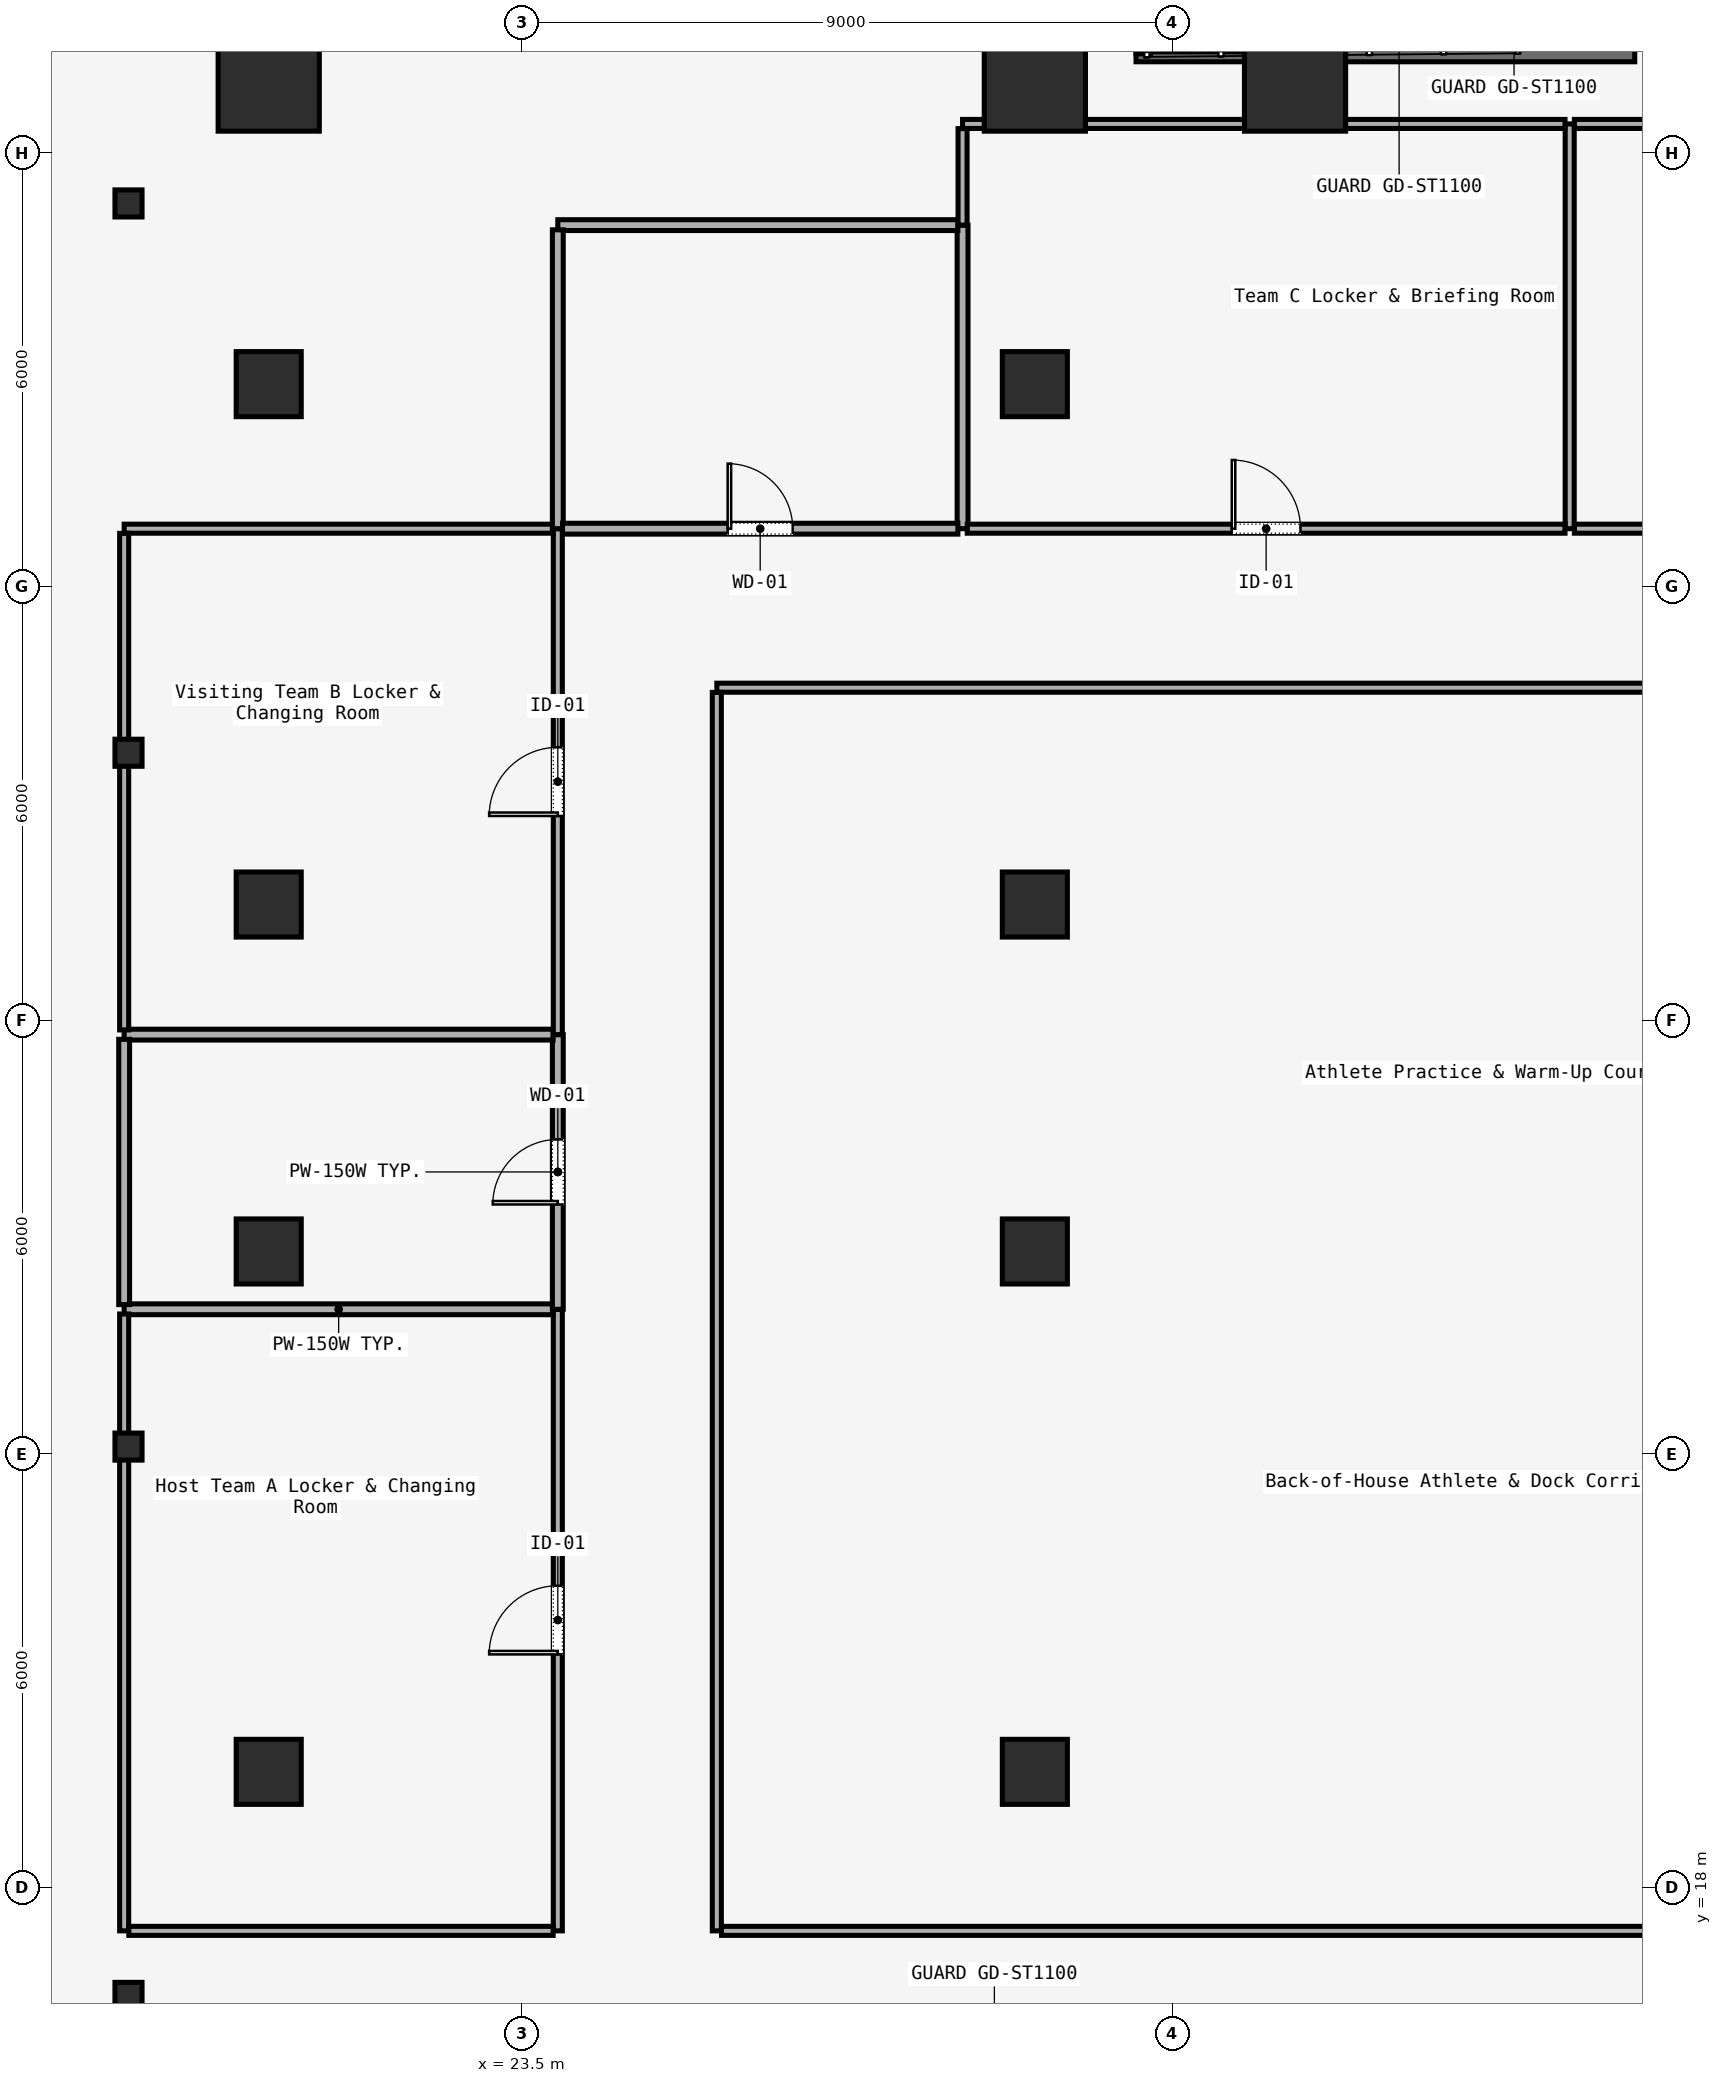
"""IFC4 building model, lengths in metres.
Left out: names, types, materials, properties, quantities, classifications, styles, units other than length and angle.
Written with IfcOpenShell. Run it as: python <this file> out.ifc"""

import sys

from ifc_helpers import new_model, si_unit, direction, frame, frame_2d, origin, origin_2d, place, context, subcontext, project, spatial, rectangle, i_section, extrude, element, fill, save


model = new_model("IFC4")
c1 = context("Model", 3, precision=1e-05, world=origin(), true_north=direction((0.0, 1.0)))
c2 = subcontext(c1, "Body", "Model", "MODEL_VIEW")
j1 = project(units=[si_unit("LENGTHUNIT", "METRE"), si_unit("PLANEANGLEUNIT", "RADIAN")], contexts=[c1])
p1 = place(None, origin())
s1 = spatial("IfcSite", under=j1, at=p1, CompositionType="ELEMENT")
p2 = place(p1, origin())
s2 = spatial("IfcBuilding", under=s1, at=p2, CompositionType="ELEMENT")
p3 = place(p2, frame((0.0, 0.0, -4.5)))
s3 = spatial("IfcBuildingStorey", under=s2, at=p3, CompositionType="ELEMENT", Elevation=-4.5)
for number, where, z_axis, x_axis in (
    (1, (20.0, 43.0, 0.0), (0.0, 0.0, 1.0), (1.0, 0.0, 0.0)),
    (2, (30.6, 43.0, 0.0), (0.0, 0.0, 1.0), (1.0, 0.0, 0.0)),
    (3, (34.2, 43.0, 0.0), (0.0, 0.0, 1.0), (1.0, 0.0, 0.0)),
):
    element("IfcColumn", number, at=place(p3, frame(where, z_axis=z_axis, x_axis=x_axis)), inside=s3, PredefinedType="COLUMN", context=c2, shape_type="SweptSolid", body=[
        extrude(rectangle(XDim=1.4, YDim=1.4, at=origin_2d()), origin(), (0.0, 0.0, 1.0), 4.1),
    ])
for number, where, z_axis, x_axis in (
    (4, (20.0, 19.6, 0.0), (0.0, 0.0, 1.0), (1.0, 0.0, 0.0)),
    (5, (20.0, 26.8, 0.0), (0.0, 0.0, 1.0), (1.0, 0.0, 0.0)),
    (6, (20.0, 31.6, 0.0), (0.0, 0.0, 1.0), (1.0, 0.0, 0.0)),
    (7, (20.0, 38.8, 0.0), (0.0, 0.0, 1.0), (1.0, 0.0, 0.0)),
    (8, (30.6, 19.6, 0.0), (0.0, 0.0, 1.0), (1.0, 0.0, 0.0)),
    (9, (30.6, 26.8, 0.0), (0.0, 0.0, 1.0), (1.0, 0.0, 0.0)),
    (10, (30.6, 31.6, 0.0), (0.0, 0.0, 1.0), (1.0, 0.0, 0.0)),
    (11, (30.6, 38.8, 0.0), (0.0, 0.0, 1.0), (1.0, 0.0, 0.0)),
):
    element("IfcColumn", number, at=place(p3, frame(where, z_axis=z_axis, x_axis=x_axis)), inside=s3, PredefinedType="COLUMN", context=c2, shape_type="SweptSolid", body=[
        extrude(rectangle(XDim=0.9, YDim=0.9, at=origin_2d()), origin(), (0.0, 0.0, 1.0), 4.1),
    ])
for number, where, z_axis, x_axis in (
    (12, (18.06, 16.5, 0.0), (0.0, 0.0, 1.0), (1.0, 0.0, 0.0)),
    (13, (18.06, 24.1, 0.0), (0.0, 0.0, 1.0), (1.0, 0.0, 0.0)),
    (14, (18.06, 33.7, 0.0), (0.0, 0.0, 1.0), (1.0, 0.0, 0.0)),
    (15, (18.06, 41.3, 0.0), (0.0, 0.0, 1.0), (1.0, 0.0, 0.0)),
):
    element("IfcColumn", number, at=place(p3, frame(where, z_axis=z_axis, x_axis=x_axis)), inside=s3, PredefinedType="COLUMN", context=c2, shape_type="SweptSolid", body=[
        extrude(i_section(OverallWidth=0.375, OverallDepth=0.375, WebThickness=0.017, FlangeThickness=0.027, FilletRadius=0.015, at=origin_2d()), origin(), (0.0, 0.0, 1.0), 4.1),
    ])
p4 = place(p3, frame((38.9, 43.36, 0.0), z_axis=(0.0, 0.0, 1.0), x_axis=(-1.0, 0.0, 0.0)))
e16 = element("IfcWall", 16, at=p4, inside=s3, PredefinedType="SOLIDWALL", context=c2, shape_type="SweptSolid", body=[
    extrude(rectangle(XDim=6.9, YDim=0.2, at=frame_2d((3.45, 0.0))), origin(), (0.0, 0.0, 1.0), 4.5),
])
p5 = place(p3, frame((32.1, 46.93, 0.0), z_axis=(0.0, 0.0, 1.0), x_axis=(0.0, -1.0, 0.0)))
e17 = element("IfcWall", 17, at=p5, inside=s3, PredefinedType="SOLIDWALL", context=c2, shape_type="SweptSolid", body=[
    extrude(rectangle(XDim=3.56, YDim=0.2, at=frame_2d((1.78, 0.0))), origin(), (0.0, 0.0, 1.0), 4.5),
])
p6 = place(p3, frame((57.735, 34.6, 0.0), z_axis=(0.0, 0.0, 1.0), x_axis=(-1.0, 0.0, 0.0)))
e18 = element("IfcWall", 18, at=p6, inside=s3, PredefinedType="PARTITIONING", context=c2, shape_type="SweptSolid", body=[
    extrude(rectangle(XDim=31.535, YDim=0.125, at=frame_2d((15.768, 0.0))), origin(), (0.0, 0.0, 1.0), 3.143),
])
p7 = place(p6, frame((15.292, 0.0, 0.0)))
e19 = element("IfcOpeningElement", 19, at=p7, cuts=e18, PredefinedType="OPENING", context=c2, shape_type="SweptSolid", body=[
    extrude(rectangle(XDim=0.95, YDim=2.2, at=frame_2d((0.475, 1.1))), frame((0.0, 0.062, 0.0), z_axis=(0.0, -1.0, 0.0), x_axis=(1.0, 0.0, 0.0)), (0.0, 0.0, 1.0), 0.125),
])
p8 = place(p3, frame((26.2, 34.535, 0.0), z_axis=(0.0, 0.0, 1.0), x_axis=(0.0, -1.0, 0.0)))
e20 = element("IfcWall", 20, at=p8, inside=s3, PredefinedType="PARTITIONING", context=c2, shape_type="SweptSolid", body=[
    extrude(rectangle(XDim=17.135, YDim=0.125, at=frame_2d((8.567, 0.0))), origin(), (0.0, 0.0, 1.0), 3.143),
])
p9 = place(p3, frame((26.265, 17.4, 0.0), z_axis=(0.0, 0.0, 1.0), x_axis=(1.0, 0.0, 0.0)))
e21 = element("IfcWall", 21, at=p9, inside=s3, PredefinedType="PARTITIONING", context=c2, shape_type="SweptSolid", body=[
    extrude(rectangle(XDim=31.47, YDim=0.125, at=frame_2d((15.735, 0.0))), origin(), (0.0, 0.0, 1.0), 3.143),
])
p10 = place(p3, frame((24.0, 17.4, 0.0), z_axis=(0.0, 0.0, 1.0), x_axis=(0.0, 1.0, 0.0)))
e22 = element("IfcWall", 22, at=p10, inside=s3, PredefinedType="PARTITIONING", context=c2, shape_type="SweptSolid", body=[
    extrude(rectangle(XDim=8.6, YDim=0.125, at=frame_2d((4.3, 0.0))), origin(), (0.0, 0.0, 1.0), 3.143),
])
p11 = place(p10, frame((3.825, 0.0, 0.0)))
e23 = element("IfcOpeningElement", 23, at=p11, cuts=e22, PredefinedType="OPENING", context=c2, shape_type="SweptSolid", body=[
    extrude(rectangle(XDim=0.95, YDim=2.2, at=frame_2d((0.475, 1.1))), frame((0.0, 0.062, 0.0), z_axis=(0.0, -1.0, 0.0), x_axis=(1.0, 0.0, 0.0)), (0.0, 0.0, 1.0), 0.125),
])
p12 = place(p3, frame((23.935, 26.0, 0.0), z_axis=(0.0, 0.0, 1.0), x_axis=(-1.0, 0.0, 0.0)))
e24 = element("IfcWall", 24, at=p12, inside=s3, PredefinedType="PARTITIONING", context=c2, shape_type="SweptSolid", body=[
    extrude(rectangle(XDim=5.935, YDim=0.15, at=frame_2d((2.968, 0.0))), origin(), (0.0, 0.0, 1.0), 3.143),
])
p13 = place(p3, frame((18.0, 25.935, 0.0), z_axis=(0.0, 0.0, 1.0), x_axis=(0.0, -1.0, 0.0)))
e25 = element("IfcWall", 25, at=p13, inside=s3, PredefinedType="PARTITIONING", context=c2, shape_type="SweptSolid", body=[
    extrude(rectangle(XDim=8.535, YDim=0.125, at=frame_2d((4.268, 0.0))), origin(), (0.0, 0.0, 1.0), 3.143),
])
p14 = place(p3, frame((18.065, 17.4, 0.0), z_axis=(0.0, 0.0, 1.0), x_axis=(1.0, 0.0, 0.0)))
e26 = element("IfcWall", 26, at=p14, inside=s3, PredefinedType="PARTITIONING", context=c2, shape_type="SweptSolid", body=[
    extrude(rectangle(XDim=5.87, YDim=0.125, at=frame_2d((2.935, 0.0))), origin(), (0.0, 0.0, 1.0), 3.143),
])
p15 = place(p3, frame((24.0, 26.0, 0.0), z_axis=(0.0, 0.0, 1.0), x_axis=(0.0, 1.0, 0.0)))
e27 = element("IfcWall", 27, at=p15, inside=s3, PredefinedType="PARTITIONING", context=c2, shape_type="SweptSolid", body=[
    extrude(rectangle(XDim=3.8, YDim=0.15, at=frame_2d((1.9, 0.0))), origin(), (0.0, 0.0, 1.0), 3.143),
])
p16 = place(p15, frame((1.45, 0.0, 0.0)))
e28 = element("IfcOpeningElement", 28, at=p16, cuts=e27, PredefinedType="OPENING", context=c2, shape_type="SweptSolid", body=[
    extrude(rectangle(XDim=0.9, YDim=2.15, at=frame_2d((0.45, 1.075))), frame((0.0, 0.075, 0.0), z_axis=(0.0, -1.0, 0.0), x_axis=(1.0, 0.0, 0.0)), (0.0, 0.0, 1.0), 0.15),
])
p17 = place(p3, frame((23.935, 29.8, 0.0), z_axis=(0.0, 0.0, 1.0), x_axis=(-1.0, 0.0, 0.0)))
e29 = element("IfcWall", 29, at=p17, inside=s3, PredefinedType="PARTITIONING", context=c2, shape_type="SweptSolid", body=[
    extrude(rectangle(XDim=5.935, YDim=0.15, at=frame_2d((2.968, 0.0))), origin(), (0.0, 0.0, 1.0), 3.143),
])
p18 = place(p3, frame((18.0, 29.735, 0.0), z_axis=(0.0, 0.0, 1.0), x_axis=(0.0, -1.0, 0.0)))
e30 = element("IfcWall", 30, at=p18, inside=s3, PredefinedType="PARTITIONING", context=c2, shape_type="SweptSolid", body=[
    extrude(rectangle(XDim=3.67, YDim=0.15, at=frame_2d((1.835, 0.0))), origin(), (0.0, 0.0, 1.0), 3.143),
])
p19 = place(p3, frame((24.0, 29.8, 0.0), z_axis=(0.0, 0.0, 1.0), x_axis=(0.0, 1.0, 0.0)))
e31 = element("IfcWall", 31, at=p19, inside=s3, PredefinedType="PARTITIONING", context=c2, shape_type="SweptSolid", body=[
    extrude(rectangle(XDim=7.0, YDim=0.125, at=frame_2d((3.5, 0.0))), origin(), (0.0, 0.0, 1.0), 3.143),
])
p20 = place(p19, frame((3.025, 0.0, 0.0)))
e32 = element("IfcOpeningElement", 32, at=p20, cuts=e31, PredefinedType="OPENING", context=c2, shape_type="SweptSolid", body=[
    extrude(rectangle(XDim=0.95, YDim=2.2, at=frame_2d((0.475, 1.1))), frame((0.0, 0.062, 0.0), z_axis=(0.0, -1.0, 0.0), x_axis=(1.0, 0.0, 0.0)), (0.0, 0.0, 1.0), 0.125),
])
p21 = place(p3, frame((23.935, 36.8, 0.0), z_axis=(0.0, 0.0, 1.0), x_axis=(-1.0, 0.0, 0.0)))
e33 = element("IfcWall", 33, at=p21, inside=s3, PredefinedType="PARTITIONING", context=c2, shape_type="SweptSolid", body=[
    extrude(rectangle(XDim=5.935, YDim=0.125, at=frame_2d((2.968, 0.0))), origin(), (0.0, 0.0, 1.0), 3.143),
])
p22 = place(p3, frame((18.0, 36.735, 0.0), z_axis=(0.0, 0.0, 1.0), x_axis=(0.0, -1.0, 0.0)))
e34 = element("IfcWall", 34, at=p22, inside=s3, PredefinedType="PARTITIONING", context=c2, shape_type="SweptSolid", body=[
    extrude(rectangle(XDim=6.87, YDim=0.125, at=frame_2d((3.435, 0.0))), origin(), (0.0, 0.0, 1.0), 3.143),
])
p23 = place(p3, frame((29.6, 36.8, 0.0), z_axis=(0.0, 0.0, 1.0), x_axis=(0.0, 1.0, 0.0)))
e35 = element("IfcWall", 35, at=p23, inside=s3, PredefinedType="PARTITIONING", context=c2, shape_type="SweptSolid", body=[
    extrude(rectangle(XDim=4.2, YDim=0.15, at=frame_2d((2.1, 0.0))), origin(), (0.0, 0.0, 1.0), 3.143),
])
p24 = place(p3, frame((29.535, 41.0, 0.0), z_axis=(0.0, 0.0, 1.0), x_axis=(-1.0, 0.0, 0.0)))
e36 = element("IfcWall", 36, at=p24, inside=s3, PredefinedType="PARTITIONING", context=c2, shape_type="SweptSolid", body=[
    extrude(rectangle(XDim=5.535, YDim=0.15, at=frame_2d((2.768, 0.0))), origin(), (0.0, 0.0, 1.0), 3.143),
])
p25 = place(p3, frame((24.0, 40.935, 0.0), z_axis=(0.0, 0.0, 1.0), x_axis=(0.0, -1.0, 0.0)))
e37 = element("IfcWall", 37, at=p25, inside=s3, PredefinedType="PARTITIONING", context=c2, shape_type="SweptSolid", body=[
    extrude(rectangle(XDim=4.135, YDim=0.15, at=frame_2d((2.067, 0.0))), origin(), (0.0, 0.0, 1.0), 3.143),
])
p26 = place(p3, frame((24.065, 36.8, 0.0), z_axis=(0.0, 0.0, 1.0), x_axis=(1.0, 0.0, 0.0)))
e38 = element("IfcWall", 38, at=p26, inside=s3, PredefinedType="PARTITIONING", context=c2, shape_type="SweptSolid", body=[
    extrude(rectangle(XDim=5.47, YDim=0.15, at=frame_2d((2.735, 0.0))), origin(), (0.0, 0.0, 1.0), 3.143),
])
p27 = place(p26, frame((2.285, 0.0, 0.0)))
e39 = element("IfcOpeningElement", 39, at=p27, cuts=e38, PredefinedType="OPENING", context=c2, shape_type="SweptSolid", body=[
    extrude(rectangle(XDim=0.9, YDim=2.15, at=frame_2d((0.45, 1.075))), frame((0.0, 0.075, 0.0), z_axis=(0.0, -1.0, 0.0), x_axis=(1.0, 0.0, 0.0)), (0.0, 0.0, 1.0), 0.15),
])
p28 = place(p3, frame((38.0, 36.8, 0.0), z_axis=(0.0, 0.0, 1.0), x_axis=(0.0, 1.0, 0.0)))
e40 = element("IfcWall", 40, at=p28, inside=s3, PredefinedType="PARTITIONING", context=c2, shape_type="SweptSolid", body=[
    extrude(rectangle(XDim=5.6, YDim=0.125, at=frame_2d((2.8, 0.0))), origin(), (0.0, 0.0, 1.0), 3.143),
])
p29 = place(p3, frame((37.935, 42.4, 0.0), z_axis=(0.0, 0.0, 1.0), x_axis=(-1.0, 0.0, 0.0)))
e41 = element("IfcWall", 41, at=p29, inside=s3, PredefinedType="PARTITIONING", context=c2, shape_type="SweptSolid", body=[
    extrude(rectangle(XDim=8.335, YDim=0.125, at=frame_2d((4.167, 0.0))), origin(), (0.0, 0.0, 1.0), 3.143),
])
p30 = place(p3, frame((29.6, 42.335, 0.0), z_axis=(0.0, 0.0, 1.0), x_axis=(0.0, -1.0, 0.0)))
e42 = element("IfcWall", 42, at=p30, inside=s3, PredefinedType="PARTITIONING", context=c2, shape_type="SweptSolid", body=[
    extrude(rectangle(XDim=1.335, YDim=0.125, at=frame_2d((0.667, 0.0))), origin(), (0.0, 0.0, 1.0), 3.143),
])
p31 = place(p3, frame((29.665, 36.8, 0.0), z_axis=(0.0, 0.0, 1.0), x_axis=(1.0, 0.0, 0.0)))
e43 = element("IfcWall", 43, at=p31, inside=s3, PredefinedType="PARTITIONING", context=c2, shape_type="SweptSolid", body=[
    extrude(rectangle(XDim=8.27, YDim=0.125, at=frame_2d((4.135, 0.0))), origin(), (0.0, 0.0, 1.0), 3.143),
])
p32 = place(p31, frame((3.66, 0.0, 0.0)))
e44 = element("IfcOpeningElement", 44, at=p32, cuts=e43, PredefinedType="OPENING", context=c2, shape_type="SweptSolid", body=[
    extrude(rectangle(XDim=0.95, YDim=2.2, at=frame_2d((0.475, 1.1))), frame((0.0, 0.062, 0.0), z_axis=(0.0, -1.0, 0.0), x_axis=(1.0, 0.0, 0.0)), (0.0, 0.0, 1.0), 0.125),
])
p33 = place(p3, frame((46.335, 42.4, 0.0), z_axis=(0.0, 0.0, 1.0), x_axis=(-1.0, 0.0, 0.0)))
e45 = element("IfcWall", 45, at=p33, inside=s3, PredefinedType="PARTITIONING", context=c2, shape_type="SweptSolid", body=[
    extrude(rectangle(XDim=8.27, YDim=0.125, at=frame_2d((4.135, 0.0))), origin(), (0.0, 0.0, 1.0), 3.143),
])
p34 = place(p3, frame((38.065, 36.8, 0.0), z_axis=(0.0, 0.0, 1.0), x_axis=(1.0, 0.0, 0.0)))
e46 = element("IfcWall", 46, at=p34, inside=s3, PredefinedType="PARTITIONING", context=c2, shape_type="SweptSolid", body=[
    extrude(rectangle(XDim=8.27, YDim=0.125, at=frame_2d((4.135, 0.0))), origin(), (0.0, 0.0, 1.0), 3.143),
])
p35 = place(p34, frame((2.76, 0.0, 0.0)))
e47 = element("IfcOpeningElement", 47, at=p35, cuts=e46, PredefinedType="OPENING", context=c2, shape_type="SweptSolid", body=[
    extrude(rectangle(XDim=0.95, YDim=2.2, at=frame_2d((0.475, 1.1))), frame((0.0, 0.062, 0.0), z_axis=(0.0, -1.0, 0.0), x_axis=(1.0, 0.0, 0.0)), (0.0, 0.0, 1.0), 0.125),
])
p36 = place(p11, origin())
e48 = element("IfcDoor", 48, at=p36, inside=s3, OperationType="SINGLE_SWING_LEFT", PredefinedType="DOOR", context=c2, shape_type="SweptSolid", body=[
    extrude(rectangle(XDim=0.95, YDim=2.2, at=frame_2d((0.475, 1.1))), frame((0.0, 0.025, 0.0), z_axis=(0.0, -1.0, 0.0), x_axis=(1.0, 0.0, 0.0)), (0.0, 0.0, 1.0), 0.05),
])
fill(e23, e48)
p37 = place(p16, origin())
e49 = element("IfcDoor", 49, at=p37, inside=s3, OperationType="SINGLE_SWING_RIGHT", PredefinedType="DOOR", context=c2, shape_type="SweptSolid", body=[
    extrude(rectangle(XDim=0.9, YDim=2.15, at=frame_2d((0.45, 1.075))), frame((0.0, 0.025, 0.0), z_axis=(0.0, -1.0, 0.0), x_axis=(1.0, 0.0, 0.0)), (0.0, 0.0, 1.0), 0.05),
])
fill(e28, e49)
p38 = place(p20, origin())
e50 = element("IfcDoor", 50, at=p38, inside=s3, OperationType="SINGLE_SWING_LEFT", PredefinedType="DOOR", context=c2, shape_type="SweptSolid", body=[
    extrude(rectangle(XDim=0.95, YDim=2.2, at=frame_2d((0.475, 1.1))), frame((0.0, 0.025, 0.0), z_axis=(0.0, -1.0, 0.0), x_axis=(1.0, 0.0, 0.0)), (0.0, 0.0, 1.0), 0.05),
])
fill(e32, e50)
p39 = place(p27, origin())
e51 = element("IfcDoor", 51, at=p39, inside=s3, OperationType="SINGLE_SWING_RIGHT", PredefinedType="DOOR", context=c2, shape_type="SweptSolid", body=[
    extrude(rectangle(XDim=0.9, YDim=2.15, at=frame_2d((0.45, 1.075))), frame((0.0, 0.025, 0.0), z_axis=(0.0, -1.0, 0.0), x_axis=(1.0, 0.0, 0.0)), (0.0, 0.0, 1.0), 0.05),
])
fill(e39, e51)
p40 = place(p32, origin())
e52 = element("IfcDoor", 52, at=p40, inside=s3, OperationType="SINGLE_SWING_LEFT", PredefinedType="DOOR", context=c2, shape_type="SweptSolid", body=[
    extrude(rectangle(XDim=0.95, YDim=2.2, at=frame_2d((0.475, 1.1))), frame((0.0, 0.025, 0.0), z_axis=(0.0, -1.0, 0.0), x_axis=(1.0, 0.0, 0.0)), (0.0, 0.0, 1.0), 0.05),
])
fill(e44, e52)
save(model, sys.argv[1])
